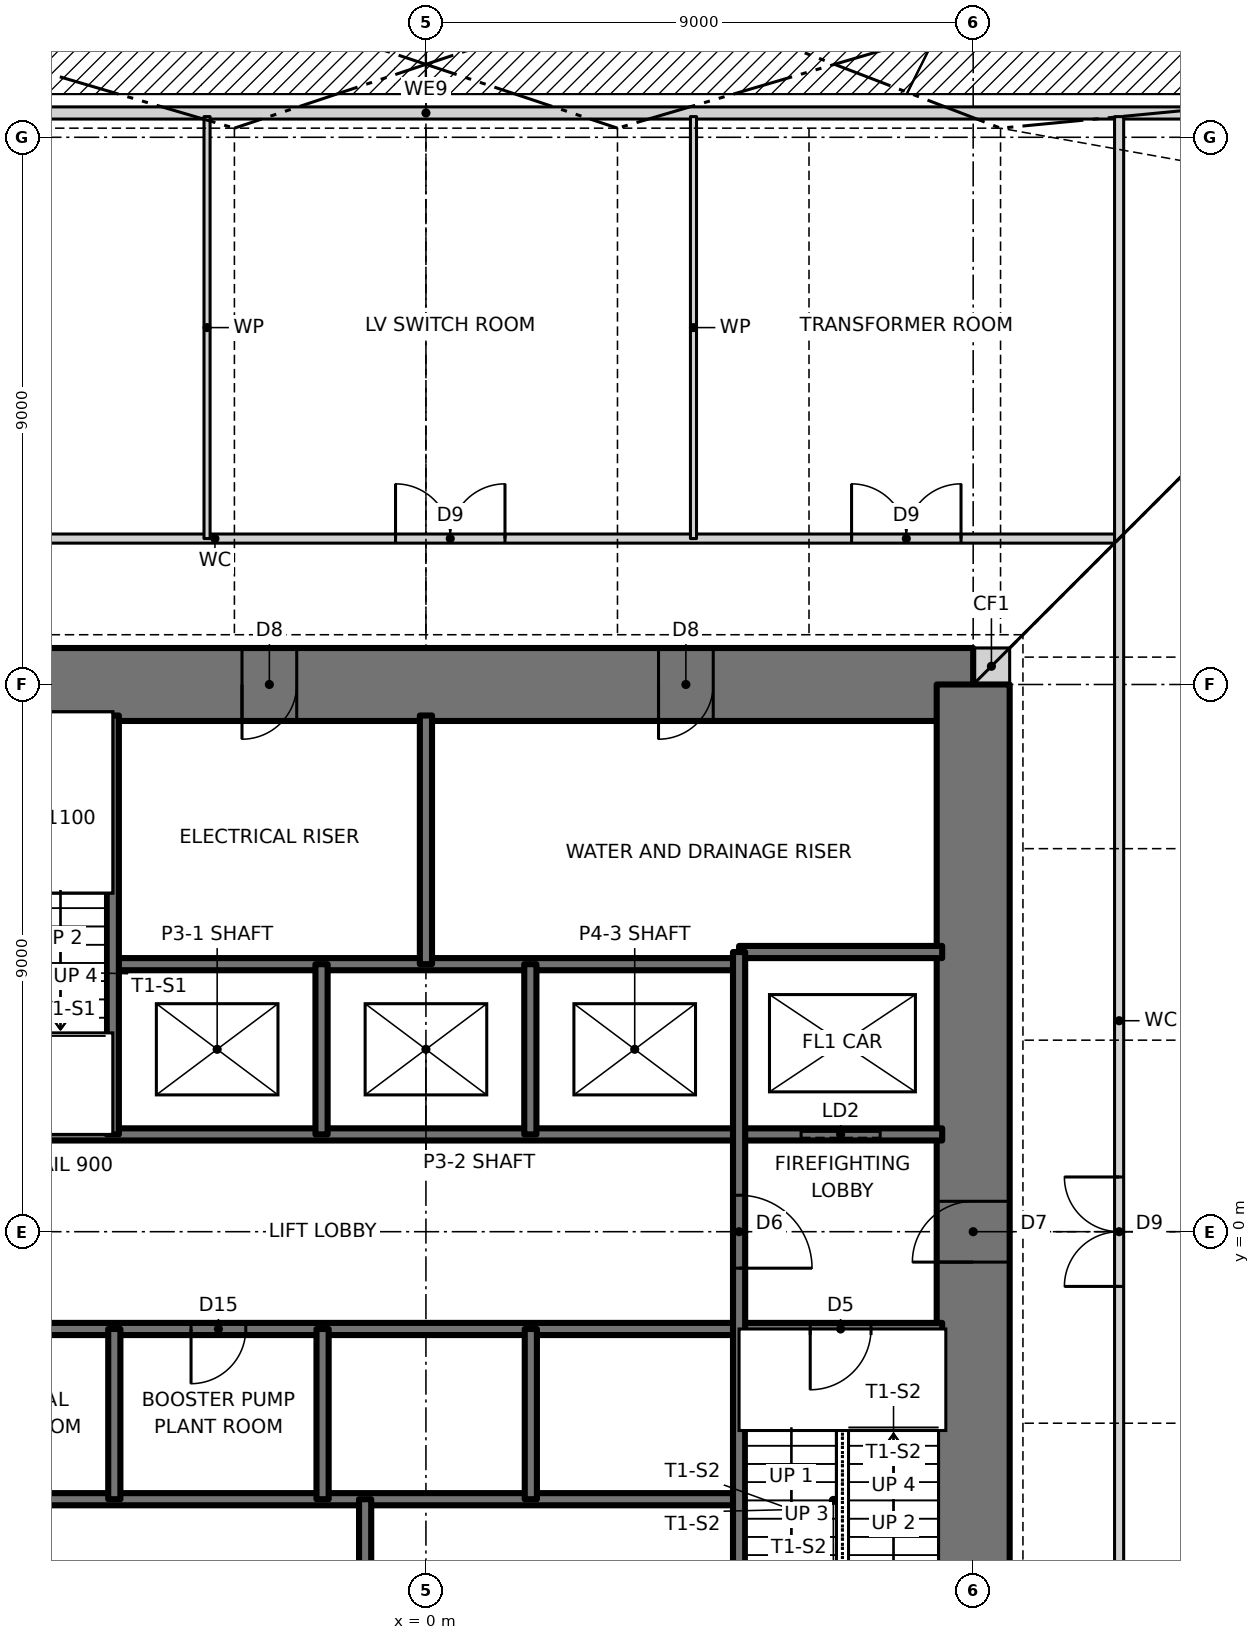
"""IFC4 building model, lengths in metres.
Left out: names, types, materials, properties, quantities, classifications, styles, units other than length and angle.
Written with IfcOpenShell. Run it as: python <this file> out.ifc"""

import sys

from ifc_helpers import new_model, si_unit, direction, frame, frame_2d, origin, origin_2d, place, context, subcontext, project, spatial, rectangle, hollow_rectangle, extrude, clip, halfspace, element, fill, save


model = new_model("IFC4")
c1 = context("Model", 3, precision=1e-05, world=origin(), true_north=direction((0.0, 1.0)))
c2 = subcontext(c1, "Body", "Model", "MODEL_VIEW")
j1 = project(units=[si_unit("LENGTHUNIT", "METRE"), si_unit("PLANEANGLEUNIT", "RADIAN")], contexts=[c1])
p1 = place(None, origin())
s1 = spatial("IfcSite", under=j1, at=p1, CompositionType="ELEMENT")
p2 = place(p1, origin())
s2 = spatial("IfcBuilding", under=s1, at=p2, CompositionType="ELEMENT")
p3 = place(p2, frame((0.0, 0.0, 143.5)))
s3 = spatial("IfcBuildingStorey", under=s2, at=p3, CompositionType="ELEMENT", Elevation=143.5)
p4 = place(p3, frame((10.8, 20.4, 0.0), z_axis=(-0.206163197348, -0.343580475001, 0.916214600002), x_axis=(0.857476506072, -0.514523120505, 0.0)))
e1 = element("IfcColumn", 1, at=p4, inside=s3, PredefinedType="COLUMN", context=c2, shape_type="Clipping", body=[
    clip(clip(extrude(hollow_rectangle(XDim=0.8, YDim=0.8, WallThickness=0.07, at=origin_2d()), origin(), (0.0, 0.0, 1.0), 6.549), halfspace(frame((0.0, 0.0, 0.0), z_axis=(0.0, -0.400687916891, -0.916214600002), x_axis=(0.857476506072, 0.471413595046, -0.206163197348)), False)), halfspace(frame((0.0, 2.404, 5.497), z_axis=(0.0, 0.400687916891, 0.916214600002), x_axis=(0.857476506072, 0.471413595046, -0.206163197348)), False)),
])
p5 = place(p3, frame((3.6, 20.4, 0.0), z_axis=(-0.07008242466, -0.350260100688, 0.934026935168), x_axis=(0.980564303347, -0.196197979098, 0.0)))
e2 = element("IfcColumn", 2, at=p5, inside=s3, PredefinedType="COLUMN", context=c2, shape_type="Clipping", body=[
    clip(clip(extrude(hollow_rectangle(XDim=0.8, YDim=0.8, WallThickness=0.07, at=origin_2d()), origin(), (0.0, 0.0, 1.0), 6.424), halfspace(frame((0.0, 0.0, 0.0), z_axis=(0.0, -0.35720258171, -0.934026935168), x_axis=(0.980564303347, 0.183254197104, -0.07008242466)), False)), halfspace(frame((0.0, 2.143, 5.604), z_axis=(0.0, 0.35720258171, 0.934026935168), x_axis=(0.980564303347, 0.183254197104, -0.07008242466)), False)),
])
p6 = place(p3, frame((-3.6, 20.4, 0.0), z_axis=(0.07008242466, -0.350260100688, 0.934026935168), x_axis=(0.980564303347, 0.196197979098, 0.0)))
e3 = element("IfcColumn", 3, at=p6, inside=s3, PredefinedType="COLUMN", context=c2, shape_type="Clipping", body=[
    clip(clip(extrude(hollow_rectangle(XDim=0.8, YDim=0.8, WallThickness=0.07, at=origin_2d()), origin(), (0.0, 0.0, 1.0), 6.424), halfspace(frame((0.0, 0.0, 0.0), z_axis=(0.0, -0.35720258171, -0.934026935168), x_axis=(0.980564303347, -0.183254197104, 0.07008242466)), False)), halfspace(frame((0.0, 2.143, 5.604), z_axis=(0.0, 0.35720258171, 0.934026935168), x_axis=(0.980564303347, -0.183254197104, 0.07008242466)), False)),
])
p7 = place(p3, frame((9.0, 9.3, 0.0), z_axis=(0.0, 0.0, 1.0), x_axis=(1.0, 0.0, 0.0)))
e4 = element("IfcWall", 4, at=p7, inside=s3, PredefinedType="SOLIDWALL", context=c2, shape_type="SweptSolid", body=[
    extrude(rectangle(XDim=0.6, YDim=0.6, at=frame_2d((0.3, 0.0))), origin(), (0.0, 0.0, 1.0), 6.0),
])
p8 = place(p3, frame((9.0, 9.0, 0.0), z_axis=(0.0, 0.0, 1.0), x_axis=(-1.0, 0.0, 0.0)))
e5 = element("IfcWall", 5, at=p8, inside=s3, PredefinedType="SHEAR", context=c2, shape_type="SweptSolid", body=[
    extrude(rectangle(XDim=18.0, YDim=1.2, at=frame_2d((9.0, 0.0))), origin(), (0.0, 0.0, 1.0), 6.0),
])
p9 = place(p8, frame((11.125, 0.0, 0.0)))
e6 = element("IfcOpeningElement", 6, at=p9, cuts=e5, PredefinedType="OPENING", context=c2, shape_type="SweptSolid", body=[
    extrude(rectangle(XDim=0.9, YDim=2.1, at=frame_2d((0.45, 1.05))), frame((0.0, 0.61, 0.0), z_axis=(0.0, -1.0, 0.0), x_axis=(1.0, 0.0, 0.0)), (0.0, 0.0, 1.0), 1.22),
])
p10 = place(p8, frame((4.275, 0.0, 0.0)))
e7 = element("IfcOpeningElement", 7, at=p10, cuts=e5, PredefinedType="OPENING", context=c2, shape_type="SweptSolid", body=[
    extrude(rectangle(XDim=0.9, YDim=2.1, at=frame_2d((0.45, 1.05))), frame((0.0, 0.61, 0.0), z_axis=(0.0, -1.0, 0.0), x_axis=(1.0, 0.0, 0.0)), (0.0, 0.0, 1.0), 1.22),
])
p11 = place(p3, frame((9.0, -9.0, 0.0), z_axis=(0.0, 0.0, 1.0), x_axis=(0.0, 1.0, 0.0)))
e8 = element("IfcWall", 8, at=p11, inside=s3, PredefinedType="SHEAR", context=c2, shape_type="SweptSolid", body=[
    extrude(rectangle(XDim=18.0, YDim=1.2, at=frame_2d((9.0, 0.0))), origin(), (0.0, 0.0, 1.0), 6.0),
])
p12 = place(p11, frame((8.5, 0.0, 0.0)))
e9 = element("IfcOpeningElement", 9, at=p12, cuts=e8, PredefinedType="OPENING", context=c2, shape_type="SweptSolid", body=[
    extrude(rectangle(XDim=1.0, YDim=2.1, at=frame_2d((0.5, 1.05))), frame((0.0, 0.61, 0.0), z_axis=(0.0, -1.0, 0.0), x_axis=(1.0, 0.0, 0.0)), (0.0, 0.0, 1.0), 1.22),
])
p13 = place(p3, frame((15.545, 18.4, 0.0), z_axis=(0.0, 0.0, 1.0), x_axis=(-1.0, 0.0, 0.0)))
e10 = element("IfcWall", 10, at=p13, inside=s3, PredefinedType="PARTITIONING", context=c2, shape_type="SweptSolid", body=[
    extrude(rectangle(XDim=31.09, YDim=0.2, at=frame_2d((15.545, 0.0))), origin(), (0.0, 0.0, 1.0), 5.7),
])
p14 = place(p3, frame((-8.49, -4.4, 0.0), z_axis=(0.0, 0.0, 1.0), x_axis=(1.0, 0.0, 0.0)))
e11 = element("IfcWall", 11, at=p14, inside=s3, PredefinedType="SOLIDWALL", context=c2, shape_type="SweptSolid", body=[
    extrude(rectangle(XDim=13.64, YDim=0.2, at=frame_2d((6.82, 0.0))), origin(), (0.0, 0.0, 1.0), 6.0),
])
p15 = place(p3, frame((-8.49, -1.6, 0.0), z_axis=(0.0, 0.0, 1.0), x_axis=(1.0, 0.0, 0.0)))
e12 = element("IfcWall", 12, at=p15, inside=s3, PredefinedType="SOLIDWALL", context=c2, shape_type="SweptSolid", body=[
    extrude(rectangle(XDim=16.98, YDim=0.2, at=frame_2d((8.49, 0.0))), origin(), (0.0, 0.0, 1.0), 6.0),
])
p16 = place(p15, frame((14.81, 0.0, 0.0)))
e13 = element("IfcOpeningElement", 13, at=p16, cuts=e12, PredefinedType="OPENING", context=c2, shape_type="SweptSolid", body=[
    extrude(rectangle(XDim=1.0, YDim=2.1, at=frame_2d((0.5, 1.05))), frame((0.0, 0.11, 0.0), z_axis=(0.0, -1.0, 0.0), x_axis=(1.0, 0.0, 0.0)), (0.0, 0.0, 1.0), 0.22),
])
p17 = place(p15, frame((1.232, 0.0, 0.0)))
e14 = element("IfcOpeningElement", 14, at=p17, cuts=e12, PredefinedType="OPENING", context=c2, shape_type="SweptSolid", body=[
    extrude(rectangle(XDim=0.9, YDim=2.1, at=frame_2d((0.45, 1.05))), frame((0.0, 0.11, 0.0), z_axis=(0.0, -1.0, 0.0), x_axis=(1.0, 0.0, 0.0)), (0.0, 0.0, 1.0), 0.22),
])
p18 = place(p15, frame((4.627, 0.0, 0.0)))
e15 = element("IfcOpeningElement", 15, at=p18, cuts=e12, PredefinedType="OPENING", context=c2, shape_type="SweptSolid", body=[
    extrude(rectangle(XDim=0.9, YDim=2.1, at=frame_2d((0.45, 1.05))), frame((0.0, 0.11, 0.0), z_axis=(0.0, -1.0, 0.0), x_axis=(1.0, 0.0, 0.0)), (0.0, 0.0, 1.0), 0.22),
])
p19 = place(p3, frame((-8.49, 1.6, 0.0), z_axis=(0.0, 0.0, 1.0), x_axis=(1.0, 0.0, 0.0)))
e16 = element("IfcWall", 16, at=p19, inside=s3, PredefinedType="SOLIDWALL", context=c2, shape_type="SweptSolid", body=[
    extrude(rectangle(XDim=16.98, YDim=0.2, at=frame_2d((8.49, 0.0))), origin(), (0.0, 0.0, 1.0), 6.0),
])
p20 = place(p19, frame((1.17, 0.0, 0.0)))
e17 = element("IfcOpeningElement", 17, at=p20, cuts=e16, PredefinedType="OPENING", context=c2, shape_type="SweptSolid", body=[
    extrude(rectangle(XDim=1.0, YDim=2.1, at=frame_2d((0.5, 1.05))), frame((0.0, 0.11, 0.0), z_axis=(0.0, -1.0, 0.0), x_axis=(1.0, 0.0, 0.0)), (0.0, 0.0, 1.0), 0.22),
])
p21 = place(p19, frame((14.66, 0.0, 0.0)))
e18 = element("IfcOpeningElement", 18, at=p21, cuts=e16, PredefinedType="OPENING", context=c2, shape_type="SweptSolid", body=[
    extrude(rectangle(XDim=1.3, YDim=2.1, at=frame_2d((0.65, 1.05))), frame((0.0, 0.11, 0.0), z_axis=(0.0, -1.0, 0.0), x_axis=(1.0, 0.0, 0.0)), (0.0, 0.0, 1.0), 0.22),
])
p22 = place(p3, frame((-5.15, 4.4, 0.0), z_axis=(0.0, 0.0, 1.0), x_axis=(1.0, 0.0, 0.0)))
e19 = element("IfcWall", 19, at=p22, inside=s3, PredefinedType="SOLIDWALL", context=c2, shape_type="SweptSolid", body=[
    extrude(rectangle(XDim=10.3, YDim=0.2, at=frame_2d((5.15, 0.0))), origin(), (0.0, 0.0, 1.0), 6.0),
])
p23 = place(p3, frame((5.15, 4.6, 0.0), z_axis=(0.0, 0.0, 1.0), x_axis=(1.0, 0.0, 0.0)))
e20 = element("IfcWall", 20, at=p23, inside=s3, PredefinedType="SOLIDWALL", context=c2, shape_type="SweptSolid", body=[
    extrude(rectangle(XDim=3.34, YDim=0.2, at=frame_2d((1.67, 0.0))), origin(), (0.0, 0.0, 1.0), 6.0),
])
p24 = place(p3, frame((-18.34, 11.4, 0.0), z_axis=(0.0, 0.0, 1.0), x_axis=(1.0, 0.0, 0.0)))
e21 = element("IfcWall", 21, at=p24, inside=s3, PredefinedType="PARTITIONING", context=c2, shape_type="SweptSolid", body=[
    extrude(rectangle(XDim=29.74, YDim=0.15, at=frame_2d((14.87, 0.0))), origin(), (0.0, 0.0, 1.0), 5.77),
])
p25 = place(p24, frame((25.34, 0.0, 0.0)))
e22 = element("IfcOpeningElement", 22, at=p25, cuts=e21, PredefinedType="OPENING", context=c2, shape_type="SweptSolid", body=[
    extrude(rectangle(XDim=1.8, YDim=2.1, at=frame_2d((0.9, 1.05))), frame((0.0, 0.085, 0.0), z_axis=(0.0, -1.0, 0.0), x_axis=(1.0, 0.0, 0.0)), (0.0, 0.0, 1.0), 0.17),
])
p26 = place(p24, frame((17.84, 0.0, 0.0)))
e23 = element("IfcOpeningElement", 23, at=p26, cuts=e21, PredefinedType="OPENING", context=c2, shape_type="SweptSolid", body=[
    extrude(rectangle(XDim=1.8, YDim=2.1, at=frame_2d((0.9, 1.05))), frame((0.0, 0.085, 0.0), z_axis=(0.0, -1.0, 0.0), x_axis=(1.0, 0.0, 0.0)), (0.0, 0.0, 1.0), 0.17),
])
p27 = place(p24, frame((9.94, 0.0, 0.0)))
e24 = element("IfcOpeningElement", 24, at=p27, cuts=e21, PredefinedType="OPENING", context=c2, shape_type="SweptSolid", body=[
    extrude(rectangle(XDim=1.8, YDim=2.1, at=frame_2d((0.9, 1.05))), frame((0.0, 0.085, 0.0), z_axis=(0.0, -1.0, 0.0), x_axis=(1.0, 0.0, 0.0)), (0.0, 0.0, 1.0), 0.17),
])
p28 = place(p3, frame((11.4, -11.4, 0.0), z_axis=(0.0, 0.0, 1.0), x_axis=(0.0, 1.0, 0.0)))
e25 = element("IfcWall", 25, at=p28, inside=s3, PredefinedType="PARTITIONING", context=c2, shape_type="SweptSolid", body=[
    extrude(rectangle(XDim=29.74, YDim=0.15, at=frame_2d((14.87, 0.0))), origin(), (0.0, 0.0, 1.0), 5.77),
])
p29 = place(p28, frame((10.5, 0.0, 0.0)))
e26 = element("IfcOpeningElement", 26, at=p29, cuts=e25, PredefinedType="OPENING", context=c2, shape_type="SweptSolid", body=[
    extrude(rectangle(XDim=1.8, YDim=2.1, at=frame_2d((0.9, 1.05))), frame((0.0, 0.085, 0.0), z_axis=(0.0, -1.0, 0.0), x_axis=(1.0, 0.0, 0.0)), (0.0, 0.0, 1.0), 0.17),
])
p30 = place(p3, frame((5.15, -8.49, 0.0), z_axis=(0.0, 0.0, 1.0), x_axis=(0.0, 1.0, 0.0)))
e27 = element("IfcWall", 27, at=p30, inside=s3, PredefinedType="SOLIDWALL", context=c2, shape_type="SweptSolid", body=[
    extrude(rectangle(XDim=13.09, YDim=0.2, at=frame_2d((6.545, 0.0))), origin(), (0.0, 0.0, 1.0), 6.0),
])
p31 = place(p30, frame((7.89, 0.0, 0.0)))
e28 = element("IfcOpeningElement", 28, at=p31, cuts=e27, PredefinedType="OPENING", context=c2, shape_type="SweptSolid", body=[
    extrude(rectangle(XDim=1.2, YDim=2.1, at=frame_2d((0.6, 1.05))), frame((0.0, 0.11, 0.0), z_axis=(0.0, -1.0, 0.0), x_axis=(1.0, 0.0, 0.0)), (0.0, 0.0, 1.0), 0.22),
])
p32 = place(p3, frame((4.4, 11.4, 0.0), z_axis=(0.0, 0.0, 1.0), x_axis=(0.0, 1.0, 0.0)))
e29 = element("IfcWall", 29, at=p32, inside=s3, PredefinedType="PARTITIONING", context=c2, shape_type="SweptSolid", body=[
    extrude(rectangle(XDim=6.94, YDim=0.1, at=frame_2d((3.47, 0.0))), origin(), (0.0, 0.0, 1.0), 5.77),
])
for number, where, z_axis, x_axis in (
    (30, (1.725, -4.4, 0.0), (0.0, 0.0, 1.0), (0.0, 1.0, 0.0)),
    (31, (1.717, 1.6, 0.0), (0.0, 0.0, 1.0), (0.0, 1.0, 0.0)),
):
    element("IfcWall", number, at=place(p3, frame(where, z_axis=z_axis, x_axis=x_axis)), inside=s3, PredefinedType="SOLIDWALL", context=c2, shape_type="SweptSolid", body=[
        extrude(rectangle(XDim=2.8, YDim=0.2, at=frame_2d((1.4, 0.0))), origin(), (0.0, 0.0, 1.0), 6.0),
    ])
for number, where, z_axis, x_axis in (
    (32, (0.0, 4.4, 0.0), (0.0, 0.0, 1.0), (0.0, 1.0, 0.0)),
    (33, (-1.0, -8.49, 0.0), (0.0, 0.0, 1.0), (0.0, 1.0, 0.0)),
):
    element("IfcWall", number, at=place(p3, frame(where, z_axis=z_axis, x_axis=x_axis)), inside=s3, PredefinedType="SOLIDWALL", context=c2, shape_type="SweptSolid", body=[
        extrude(rectangle(XDim=4.09, YDim=0.2, at=frame_2d((2.045, 0.0))), origin(), (0.0, 0.0, 1.0), 6.0),
    ])
for number, where, z_axis, x_axis in (
    (34, (-1.7, -4.4, 0.0), (0.0, 0.0, 1.0), (0.0, 1.0, 0.0)),
    (35, (-1.717, 1.6, 0.0), (0.0, 0.0, 1.0), (0.0, 1.0, 0.0)),
):
    element("IfcWall", number, at=place(p3, frame(where, z_axis=z_axis, x_axis=x_axis)), inside=s3, PredefinedType="SOLIDWALL", context=c2, shape_type="SweptSolid", body=[
        extrude(rectangle(XDim=2.8, YDim=0.2, at=frame_2d((1.4, 0.0))), origin(), (0.0, 0.0, 1.0), 6.0),
    ])
p33 = place(p3, frame((-3.6, 11.4, 0.0), z_axis=(0.0, 0.0, 1.0), x_axis=(0.0, 1.0, 0.0)))
e36 = element("IfcWall", 36, at=p33, inside=s3, PredefinedType="PARTITIONING", context=c2, shape_type="SweptSolid", body=[
    extrude(rectangle(XDim=6.94, YDim=0.1, at=frame_2d((3.47, 0.0))), origin(), (0.0, 0.0, 1.0), 5.77),
])
p34 = place(p3, frame((-5.125, -4.4, 0.0), z_axis=(0.0, 0.0, 1.0), x_axis=(0.0, 1.0, 0.0)))
e37 = element("IfcWall", 37, at=p34, inside=s3, PredefinedType="SOLIDWALL", context=c2, shape_type="SweptSolid", body=[
    extrude(rectangle(XDim=2.8, YDim=0.2, at=frame_2d((1.4, 0.0))), origin(), (0.0, 0.0, 1.0), 6.0),
])
p35 = place(p3, frame((-5.15, 1.6, 0.0), z_axis=(0.0, 0.0, 1.0), x_axis=(0.0, 1.0, 0.0)))
e38 = element("IfcWall", 38, at=p35, inside=s3, PredefinedType="SOLIDWALL", context=c2, shape_type="SweptSolid", body=[
    extrude(rectangle(XDim=6.89, YDim=0.2, at=frame_2d((3.445, 0.0))), origin(), (0.0, 0.0, 1.0), 6.0),
])
p36 = place(p16, frame((1.0, 0.0, 0.0), z_axis=(0.0, 0.0, 1.0), x_axis=(-1.0, 0.0, 0.0)))
e39 = element("IfcDoor", 39, at=p36, inside=s3, OperationType="SINGLE_SWING_RIGHT", PredefinedType="DOOR", context=c2, shape_type="SweptSolid", body=[
    extrude(rectangle(XDim=1.0, YDim=2.1, at=frame_2d((0.5, 1.05))), frame((0.0, 0.025, 0.0), z_axis=(0.0, -1.0, 0.0), x_axis=(1.0, 0.0, 0.0)), (0.0, 0.0, 1.0), 0.05),
])
fill(e13, e39)
p37 = place(p31, frame((1.2, 0.0, 0.0), z_axis=(0.0, 0.0, 1.0), x_axis=(-1.0, 0.0, 0.0)))
e40 = element("IfcDoor", 40, at=p37, inside=s3, OperationType="SINGLE_SWING_RIGHT", PredefinedType="DOOR", context=c2, shape_type="SweptSolid", body=[
    extrude(rectangle(XDim=1.2, YDim=2.1, at=frame_2d((0.6, 1.05))), frame((0.0, 0.025, 0.0), z_axis=(0.0, -1.0, 0.0), x_axis=(1.0, 0.0, 0.0)), (0.0, 0.0, 1.0), 0.05),
])
fill(e28, e40)
p38 = place(p18, frame((0.9, 0.0, 0.0), z_axis=(0.0, 0.0, 1.0), x_axis=(-1.0, 0.0, 0.0)))
e41 = element("IfcDoor", 41, at=p38, inside=s3, OperationType="SINGLE_SWING_RIGHT", PredefinedType="DOOR", context=c2, shape_type="SweptSolid", body=[
    extrude(rectangle(XDim=0.9, YDim=2.1, at=frame_2d((0.45, 1.05))), frame((0.0, 0.025, 0.0), z_axis=(0.0, -1.0, 0.0), x_axis=(1.0, 0.0, 0.0)), (0.0, 0.0, 1.0), 0.05),
])
fill(e15, e41)
p39 = place(p25, origin())
e42 = element("IfcDoor", 42, at=p39, inside=s3, OperationType="DOUBLE_DOOR_SINGLE_SWING", PredefinedType="DOOR", context=c2, shape_type="SweptSolid", body=[
    extrude(rectangle(XDim=1.8, YDim=2.1, at=frame_2d((0.9, 1.05))), frame((0.0, 0.025, 0.0), z_axis=(0.0, -1.0, 0.0), x_axis=(1.0, 0.0, 0.0)), (0.0, 0.0, 1.0), 0.05),
])
fill(e22, e42)
p40 = place(p26, origin())
e43 = element("IfcDoor", 43, at=p40, inside=s3, OperationType="DOUBLE_DOOR_SINGLE_SWING", PredefinedType="DOOR", context=c2, shape_type="SweptSolid", body=[
    extrude(rectangle(XDim=1.8, YDim=2.1, at=frame_2d((0.9, 1.05))), frame((0.0, 0.025, 0.0), z_axis=(0.0, -1.0, 0.0), x_axis=(1.0, 0.0, 0.0)), (0.0, 0.0, 1.0), 0.05),
])
fill(e23, e43)
p41 = place(p29, origin())
e44 = element("IfcDoor", 44, at=p41, inside=s3, OperationType="DOUBLE_DOOR_SINGLE_SWING", PredefinedType="DOOR", context=c2, shape_type="SweptSolid", body=[
    extrude(rectangle(XDim=1.8, YDim=2.1, at=frame_2d((0.9, 1.05))), frame((0.0, 0.025, 0.0), z_axis=(0.0, -1.0, 0.0), x_axis=(1.0, 0.0, 0.0)), (0.0, 0.0, 1.0), 0.05),
])
fill(e26, e44)
p42 = place(p12, origin())
e45 = element("IfcDoor", 45, at=p42, inside=s3, OperationType="SINGLE_SWING_LEFT", PredefinedType="DOOR", context=c2, shape_type="SweptSolid", body=[
    extrude(rectangle(XDim=1.0, YDim=2.1, at=frame_2d((0.5, 1.05))), frame((0.0, 0.025, 0.0), z_axis=(0.0, -1.0, 0.0), x_axis=(1.0, 0.0, 0.0)), (0.0, 0.0, 1.0), 0.05),
])
fill(e9, e45)
p43 = place(p9, origin())
e46 = element("IfcDoor", 46, at=p43, inside=s3, OperationType="SINGLE_SWING_RIGHT", PredefinedType="DOOR", context=c2, shape_type="SweptSolid", body=[
    extrude(rectangle(XDim=0.9, YDim=2.1, at=frame_2d((0.45, 1.05))), frame((0.0, 0.025, 0.0), z_axis=(0.0, -1.0, 0.0), x_axis=(1.0, 0.0, 0.0)), (0.0, 0.0, 1.0), 0.05),
])
fill(e6, e46)
p44 = place(p10, origin())
e47 = element("IfcDoor", 47, at=p44, inside=s3, OperationType="SINGLE_SWING_RIGHT", PredefinedType="DOOR", context=c2, shape_type="SweptSolid", body=[
    extrude(rectangle(XDim=0.9, YDim=2.1, at=frame_2d((0.45, 1.05))), frame((0.0, 0.025, 0.0), z_axis=(0.0, -1.0, 0.0), x_axis=(1.0, 0.0, 0.0)), (0.0, 0.0, 1.0), 0.05),
])
fill(e7, e47)
p45 = place(p21, origin())
e48 = element("IfcDoor", 48, at=p45, inside=s3, OperationType="SLIDING_TO_LEFT", PredefinedType="DOOR", context=c2, shape_type="SweptSolid", body=[
    extrude(rectangle(XDim=1.3, YDim=2.1, at=frame_2d((0.65, 1.05))), frame((0.0, 0.025, 0.0), z_axis=(0.0, -1.0, 0.0), x_axis=(1.0, 0.0, 0.0)), (0.0, 0.0, 1.0), 0.05),
])
fill(e18, e48)
save(model, sys.argv[1])
